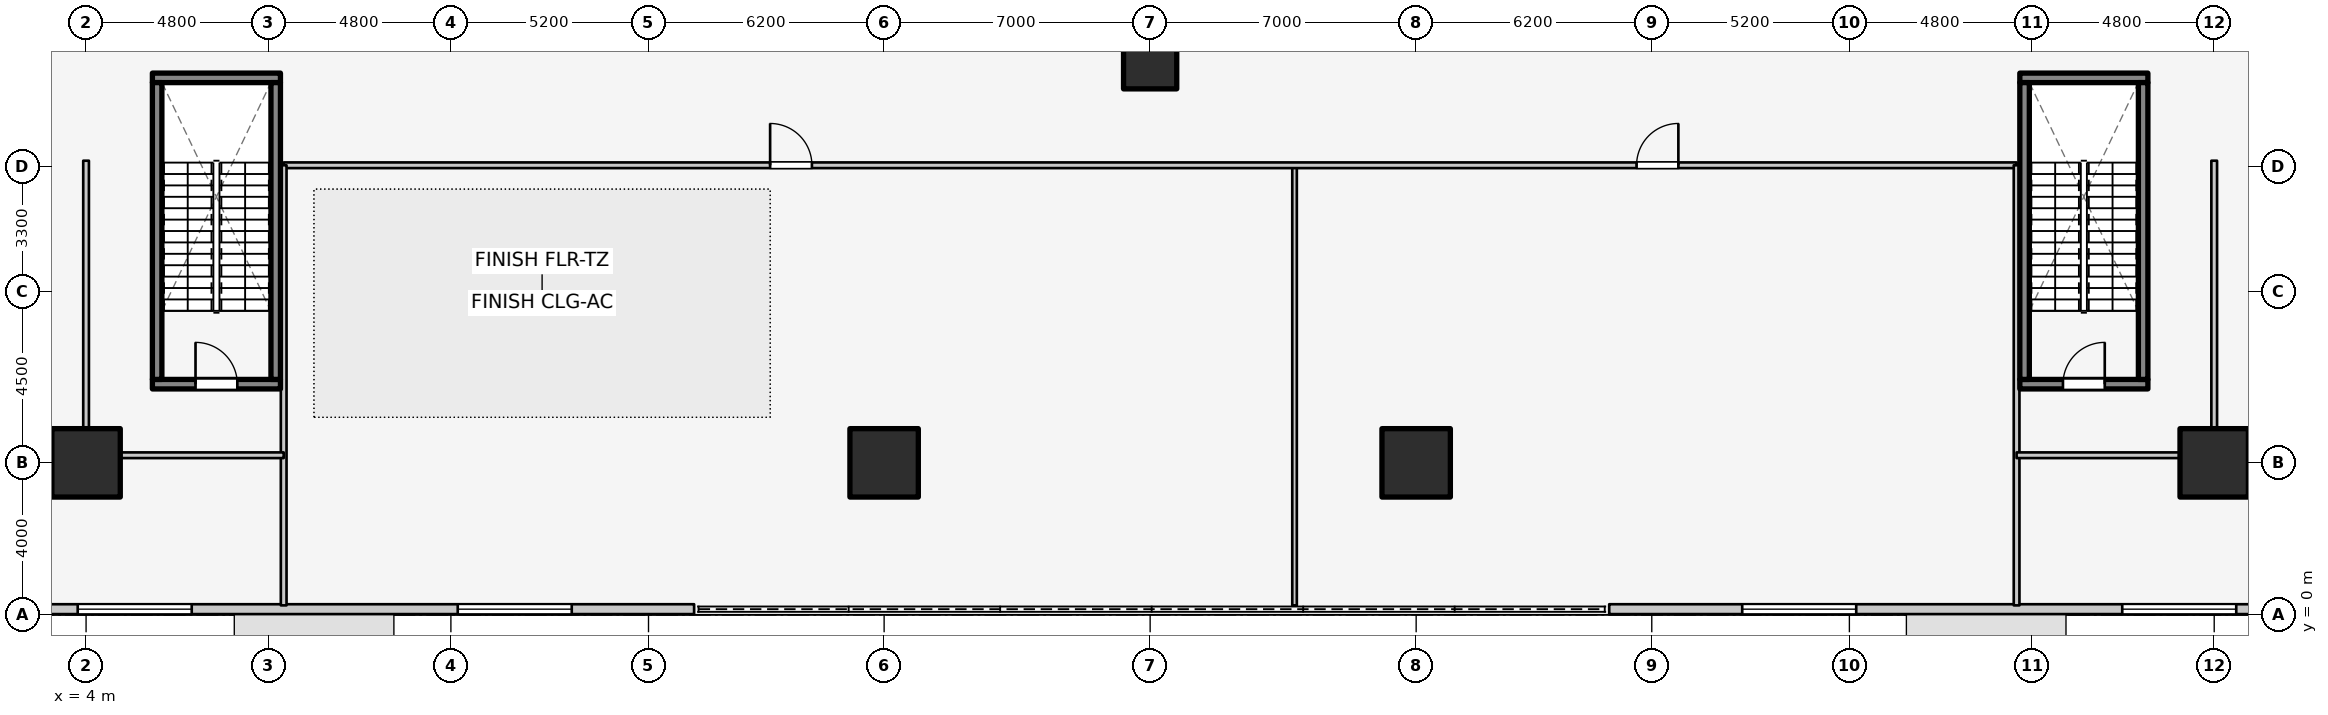
"""IFC4 building model, lengths in metres.
Left out: names, types, materials, properties, quantities, classifications, styles, units other than length and angle.
Written with IfcOpenShell. Run it as: python <this file> out.ifc"""

import sys

from ifc_helpers import new_model, si_unit, direction, frame, frame_2d, origin, origin_2d, place, context, subcontext, project, spatial, rectangle, extrude, element, fill, save


model = new_model("IFC4")
c1 = context("Model", 3, precision=1e-05, world=origin(), true_north=direction((0.0, 1.0)))
c2 = subcontext(c1, "Body", "Model", "MODEL_VIEW")
j1 = project(units=[si_unit("LENGTHUNIT", "METRE"), si_unit("PLANEANGLEUNIT", "RADIAN")], contexts=[c1])
p1 = place(None, origin())
s1 = spatial("IfcSite", under=j1, at=p1, CompositionType="ELEMENT")
p2 = place(p1, origin())
s2 = spatial("IfcBuilding", under=s1, at=p2, CompositionType="ELEMENT")
p3 = place(p2, frame((0.0, 0.0, 4.6)))
s3 = spatial("IfcBuildingStorey", under=s2, at=p3, CompositionType="ELEMENT", Elevation=4.6)
p4 = place(p3, frame((5.745, 6.07, 0.0), z_axis=(0.0, 0.0, 1.0), x_axis=(1.0, 0.0, 0.0)))
e1 = element("IfcWall", 1, at=p4, inside=s3, PredefinedType="SOLIDWALL", context=c2, shape_type="SweptSolid", body=[
    extrude(rectangle(XDim=3.37, YDim=0.25, at=frame_2d((1.685, 0.0))), origin(), (0.0, 0.0, 1.0), 4.6),
])
p5 = place(p4, frame((1.135, 0.0, 0.0)))
e2 = element("IfcOpeningElement", 2, at=p5, cuts=e1, PredefinedType="OPENING", context=c2, shape_type="SweptSolid", body=[
    extrude(rectangle(XDim=1.1, YDim=2.1, at=frame_2d((0.55, 1.05))), frame((0.0, 0.135, 0.0), z_axis=(0.0, -1.0, 0.0), x_axis=(1.0, 0.0, 0.0)), (0.0, 0.0, 1.0), 0.27),
])
p6 = place(p3, frame((5.745, 14.13, 0.0), z_axis=(0.0, 0.0, 1.0), x_axis=(1.0, 0.0, 0.0)))
e3 = element("IfcWall", 3, at=p6, inside=s3, PredefinedType="SOLIDWALL", context=c2, shape_type="SweptSolid", body=[
    extrude(rectangle(XDim=3.37, YDim=0.25, at=frame_2d((1.685, 0.0))), origin(), (0.0, 0.0, 1.0), 4.6),
])
for number, where, z_axis, x_axis in (
    (4, (5.87, 6.195, 0.0), (0.0, 0.0, 1.0), (0.0, 1.0, 0.0)),
    (5, (8.99, 6.195, 0.0), (0.0, 0.0, 1.0), (0.0, 1.0, 0.0)),
):
    element("IfcWall", number, at=place(p3, frame(where, z_axis=z_axis, x_axis=x_axis)), inside=s3, PredefinedType="SOLIDWALL", context=c2, shape_type="SweptSolid", body=[
        extrude(rectangle(XDim=7.81, YDim=0.25, at=frame_2d((3.905, 0.0))), origin(), (0.0, 0.0, 1.0), 4.6),
    ])
p7 = place(p3, frame((54.885, 6.07, 0.0), z_axis=(0.0, 0.0, 1.0), x_axis=(1.0, 0.0, 0.0)))
e6 = element("IfcWall", 6, at=p7, inside=s3, PredefinedType="SOLIDWALL", context=c2, shape_type="SweptSolid", body=[
    extrude(rectangle(XDim=3.37, YDim=0.25, at=frame_2d((1.685, 0.0))), origin(), (0.0, 0.0, 1.0), 4.6),
])
p8 = place(p7, frame((1.135, 0.0, 0.0)))
e7 = element("IfcOpeningElement", 7, at=p8, cuts=e6, PredefinedType="OPENING", context=c2, shape_type="SweptSolid", body=[
    extrude(rectangle(XDim=1.1, YDim=2.1, at=frame_2d((0.55, 1.05))), frame((0.0, 0.135, 0.0), z_axis=(0.0, -1.0, 0.0), x_axis=(1.0, 0.0, 0.0)), (0.0, 0.0, 1.0), 0.27),
])
p9 = place(p3, frame((54.885, 14.13, 0.0), z_axis=(0.0, 0.0, 1.0), x_axis=(1.0, 0.0, 0.0)))
e8 = element("IfcWall", 8, at=p9, inside=s3, PredefinedType="SOLIDWALL", context=c2, shape_type="SweptSolid", body=[
    extrude(rectangle(XDim=3.37, YDim=0.25, at=frame_2d((1.685, 0.0))), origin(), (0.0, 0.0, 1.0), 4.6),
])
for number, where, z_axis, x_axis in (
    (9, (55.01, 6.195, 0.0), (0.0, 0.0, 1.0), (0.0, 1.0, 0.0)),
    (10, (58.13, 6.195, 0.0), (0.0, 0.0, 1.0), (0.0, 1.0, 0.0)),
):
    element("IfcWall", number, at=place(p3, frame(where, z_axis=z_axis, x_axis=x_axis)), inside=s3, PredefinedType="SOLIDWALL", context=c2, shape_type="SweptSolid", body=[
        extrude(rectangle(XDim=7.81, YDim=0.25, at=frame_2d((3.905, 0.0))), origin(), (0.0, 0.0, 1.0), 4.6),
    ])
for number, where, z_axis, x_axis in (
    (11, (4.0, 4.0, 0.0), (0.0, 0.0, 1.0), (1.0, 0.0, 0.0)),
    (12, (25.0, 4.0, 0.0), (0.0, 0.0, 1.0), (1.0, 0.0, 0.0)),
    (13, (39.0, 4.0, 0.0), (0.0, 0.0, 1.0), (1.0, 0.0, 0.0)),
    (14, (60.0, 4.0, 0.0), (0.0, 0.0, 1.0), (1.0, 0.0, 0.0)),
):
    element("IfcColumn", number, at=place(p3, frame(where, z_axis=z_axis, x_axis=x_axis)), inside=s3, PredefinedType="COLUMN", context=c2, shape_type="SweptSolid", body=[
        extrude(rectangle(XDim=1.8, YDim=1.8, at=origin_2d()), origin(), (0.0, 0.0, 1.0), 4.6),
    ])
p10 = place(p3, frame((32.0, 14.54, 0.0), z_axis=(0.0, 0.0, 1.0), x_axis=(1.0, 0.0, 0.0)))
e15 = element("IfcColumn", 15, at=p10, inside=s3, PredefinedType="COLUMN", context=c2, shape_type="SweptSolid", body=[
    extrude(rectangle(XDim=1.4, YDim=1.4, at=origin_2d()), origin(), (0.0, 0.0, 1.0), 4.6),
])
p11 = place(p3, frame((0.28, 0.15, 0.0), z_axis=(0.0, 0.0, 1.0), x_axis=(1.0, 0.0, 0.0)))
e16 = element("IfcWall", 16, at=p11, inside=s3, PredefinedType="STANDARD", context=c2, shape_type="SweptSolid", body=[
    extrude(rectangle(XDim=19.72, YDim=0.26, at=frame_2d((9.86, 0.0))), origin(), (0.0, 0.0, 1.0), 4.28),
])
p12 = place(p11, frame((3.5, 0.0, 0.9)))
e17 = element("IfcOpeningElement", 17, at=p12, cuts=e16, PredefinedType="OPENING", context=c2, shape_type="SweptSolid", body=[
    extrude(rectangle(XDim=3.0, YDim=2.4, at=frame_2d((1.5, 1.2))), frame((0.0, 0.14, 0.0), z_axis=(0.0, -1.0, 0.0), x_axis=(1.0, 0.0, 0.0)), (0.0, 0.0, 1.0), 0.28),
])
p13 = place(p11, frame((13.5, 0.0, 0.9)))
e18 = element("IfcOpeningElement", 18, at=p13, cuts=e16, PredefinedType="OPENING", context=c2, shape_type="SweptSolid", body=[
    extrude(rectangle(XDim=3.0, YDim=2.4, at=frame_2d((1.5, 1.2))), frame((0.0, 0.14, 0.0), z_axis=(0.0, -1.0, 0.0), x_axis=(1.0, 0.0, 0.0)), (0.0, 0.0, 1.0), 0.28),
])
p14 = place(p3, frame((44.08, 0.15, 0.0), z_axis=(0.0, 0.0, 1.0), x_axis=(1.0, 0.0, 0.0)))
e19 = element("IfcWall", 19, at=p14, inside=s3, PredefinedType="STANDARD", context=c2, shape_type="SweptSolid", body=[
    extrude(rectangle(XDim=19.64, YDim=0.26, at=frame_2d((9.82, 0.0))), origin(), (0.0, 0.0, 1.0), 4.28),
])
p15 = place(p14, frame((3.5, 0.0, 0.9)))
e20 = element("IfcOpeningElement", 20, at=p15, cuts=e19, PredefinedType="OPENING", context=c2, shape_type="SweptSolid", body=[
    extrude(rectangle(XDim=3.0, YDim=2.4, at=frame_2d((1.5, 1.2))), frame((0.0, 0.14, 0.0), z_axis=(0.0, -1.0, 0.0), x_axis=(1.0, 0.0, 0.0)), (0.0, 0.0, 1.0), 0.28),
])
p16 = place(p14, frame((13.5, 0.0, 0.9)))
e21 = element("IfcOpeningElement", 21, at=p16, cuts=e19, PredefinedType="OPENING", context=c2, shape_type="SweptSolid", body=[
    extrude(rectangle(XDim=3.0, YDim=2.4, at=frame_2d((1.5, 1.2))), frame((0.0, 0.14, 0.0), z_axis=(0.0, -1.0, 0.0), x_axis=(1.0, 0.0, 0.0)), (0.0, 0.0, 1.0), 0.28),
])
for number, where, z_axis, x_axis in (
    (22, (30.157, 15.157, 0.0), (0.0, 0.0, 1.0), (0.989, -0.149, 0.0)),
    (23, (32.0, 14.88, 0.0), (0.0, 0.0, 1.0), (0.989, 0.149, 0.0)),
):
    element("IfcWall", number, at=place(p3, frame(where, z_axis=z_axis, x_axis=x_axis)), inside=s3, PredefinedType="STANDARD", context=c2, shape_type="SweptSolid", body=[
        extrude(rectangle(XDim=1.864, YDim=0.23, at=frame_2d((0.932, 0.0))), origin(), (0.0, 0.0, 1.0), 3.28),
    ])
p17 = place(p3, frame((35.8, 0.25, 0.0), z_axis=(0.0, 0.0, 1.0), x_axis=(0.0, 1.0, 0.0)))
e24 = element("IfcWall", 24, at=p17, inside=s3, PredefinedType="MOVABLE", context=c2, shape_type="SweptSolid", body=[
    extrude(rectangle(XDim=11.53, YDim=0.12, at=frame_2d((5.765, 0.0))), origin(), (0.0, 0.0, 1.0), 3.3),
])
p18 = place(p3, frame((9.2, 11.83, 0.0), z_axis=(0.0, 0.0, 1.0), x_axis=(1.0, 0.0, 0.0)))
e25 = element("IfcWall", 25, at=p18, inside=s3, PredefinedType="PARTITIONING", context=c2, shape_type="SweptSolid", body=[
    extrude(rectangle(XDim=45.6, YDim=0.15, at=frame_2d((22.8, 0.0))), origin(), (0.0, 0.0, 1.0), 3.3),
])
p19 = place(p18, frame((12.8, 0.0, 0.0)))
e26 = element("IfcOpeningElement", 26, at=p19, cuts=e25, PredefinedType="OPENING", context=c2, shape_type="SweptSolid", body=[
    extrude(rectangle(XDim=1.1, YDim=2.1, at=frame_2d((0.55, 1.05))), frame((0.0, 0.085, 0.0), z_axis=(0.0, -1.0, 0.0), x_axis=(1.0, 0.0, 0.0)), (0.0, 0.0, 1.0), 0.17),
])
p20 = place(p18, frame((35.6, 0.0, 0.0)))
e27 = element("IfcOpeningElement", 27, at=p20, cuts=e25, PredefinedType="OPENING", context=c2, shape_type="SweptSolid", body=[
    extrude(rectangle(XDim=1.1, YDim=2.1, at=frame_2d((0.55, 1.05))), frame((0.0, 0.085, 0.0), z_axis=(0.0, -1.0, 0.0), x_axis=(1.0, 0.0, 0.0)), (0.0, 0.0, 1.0), 0.17),
])
for number, where, z_axis, x_axis in (
    (28, (9.2, 0.25, 0.0), (0.0, 0.0, 1.0), (0.0, 1.0, 0.0)),
    (29, (54.8, 0.25, 0.0), (0.0, 0.0, 1.0), (0.0, 1.0, 0.0)),
):
    element("IfcWall", number, at=place(p3, frame(where, z_axis=z_axis, x_axis=x_axis)), inside=s3, PredefinedType="PARTITIONING", context=c2, shape_type="SweptSolid", body=[
        extrude(rectangle(XDim=11.58, YDim=0.15, at=frame_2d((5.79, 0.0))), origin(), (0.0, 0.0, 1.0), 3.3),
    ])
p21 = place(p3, frame((4.0, 4.2, 0.0), z_axis=(0.0, 0.0, 1.0), x_axis=(0.0, 1.0, 0.0)))
e30 = element("IfcWall", 30, at=p21, inside=s3, PredefinedType="PARTITIONING", context=c2, shape_type="SweptSolid", body=[
    extrude(rectangle(XDim=7.75, YDim=0.15, at=frame_2d((3.875, 0.0))), origin(), (0.0, 0.0, 1.0), 3.3),
])
p22 = place(p3, frame((4.0, 4.2, 0.0), z_axis=(0.0, 0.0, 1.0), x_axis=(1.0, 0.0, 0.0)))
e31 = element("IfcWall", 31, at=p22, inside=s3, PredefinedType="PARTITIONING", context=c2, shape_type="SweptSolid", body=[
    extrude(rectangle(XDim=5.2, YDim=0.15, at=frame_2d((2.6, 0.0))), origin(), (0.0, 0.0, 1.0), 3.3),
])
p23 = place(p3, frame((60.0, 4.2, 0.0), z_axis=(0.0, 0.0, 1.0), x_axis=(0.0, 1.0, 0.0)))
e32 = element("IfcWall", 32, at=p23, inside=s3, PredefinedType="PARTITIONING", context=c2, shape_type="SweptSolid", body=[
    extrude(rectangle(XDim=7.75, YDim=0.15, at=frame_2d((3.875, 0.0))), origin(), (0.0, 0.0, 1.0), 3.3),
])
p24 = place(p3, frame((54.8, 4.2, 0.0), z_axis=(0.0, 0.0, 1.0), x_axis=(1.0, 0.0, 0.0)))
e33 = element("IfcWall", 33, at=p24, inside=s3, PredefinedType="PARTITIONING", context=c2, shape_type="SweptSolid", body=[
    extrude(rectangle(XDim=5.2, YDim=0.15, at=frame_2d((2.6, 0.0))), origin(), (0.0, 0.0, 1.0), 3.3),
])
p25 = place(p12, origin())
e34 = element("IfcWindow", 34, at=p25, inside=s3, PartitioningType="SINGLE_PANEL", PredefinedType="WINDOW", context=c2, shape_type="SweptSolid", body=[
    extrude(rectangle(XDim=3.0, YDim=2.4, at=frame_2d((1.5, 1.2))), frame((0.0, 0.03, 0.0), z_axis=(0.0, -1.0, 0.0), x_axis=(1.0, 0.0, 0.0)), (0.0, 0.0, 1.0), 0.06),
])
fill(e17, e34)
p26 = place(p13, origin())
e35 = element("IfcWindow", 35, at=p26, inside=s3, PartitioningType="SINGLE_PANEL", PredefinedType="WINDOW", context=c2, shape_type="SweptSolid", body=[
    extrude(rectangle(XDim=3.0, YDim=2.4, at=frame_2d((1.5, 1.2))), frame((0.0, 0.03, 0.0), z_axis=(0.0, -1.0, 0.0), x_axis=(1.0, 0.0, 0.0)), (0.0, 0.0, 1.0), 0.06),
])
fill(e18, e35)
p27 = place(p15, origin())
e36 = element("IfcWindow", 36, at=p27, inside=s3, PartitioningType="SINGLE_PANEL", PredefinedType="WINDOW", context=c2, shape_type="SweptSolid", body=[
    extrude(rectangle(XDim=3.0, YDim=2.4, at=frame_2d((1.5, 1.2))), frame((0.0, 0.03, 0.0), z_axis=(0.0, -1.0, 0.0), x_axis=(1.0, 0.0, 0.0)), (0.0, 0.0, 1.0), 0.06),
])
fill(e20, e36)
p28 = place(p16, origin())
e37 = element("IfcWindow", 37, at=p28, inside=s3, PartitioningType="SINGLE_PANEL", PredefinedType="WINDOW", context=c2, shape_type="SweptSolid", body=[
    extrude(rectangle(XDim=3.0, YDim=2.4, at=frame_2d((1.5, 1.2))), frame((0.0, 0.03, 0.0), z_axis=(0.0, -1.0, 0.0), x_axis=(1.0, 0.0, 0.0)), (0.0, 0.0, 1.0), 0.06),
])
fill(e21, e37)
p29 = place(p5, origin())
e38 = element("IfcDoor", 38, at=p29, inside=s3, OperationType="SINGLE_SWING_LEFT", PredefinedType="DOOR", context=c2, shape_type="SweptSolid", body=[
    extrude(rectangle(XDim=1.1, YDim=2.1, at=frame_2d((0.55, 1.05))), frame((0.0, 0.025, 0.0), z_axis=(0.0, -1.0, 0.0), x_axis=(1.0, 0.0, 0.0)), (0.0, 0.0, 1.0), 0.05),
])
fill(e2, e38)
p30 = place(p8, origin())
e39 = element("IfcDoor", 39, at=p30, inside=s3, OperationType="SINGLE_SWING_RIGHT", PredefinedType="DOOR", context=c2, shape_type="SweptSolid", body=[
    extrude(rectangle(XDim=1.1, YDim=2.1, at=frame_2d((0.55, 1.05))), frame((0.0, 0.025, 0.0), z_axis=(0.0, -1.0, 0.0), x_axis=(1.0, 0.0, 0.0)), (0.0, 0.0, 1.0), 0.05),
])
fill(e7, e39)
p31 = place(p19, origin())
e40 = element("IfcDoor", 40, at=p31, inside=s3, OperationType="SINGLE_SWING_LEFT", PredefinedType="DOOR", context=c2, shape_type="SweptSolid", body=[
    extrude(rectangle(XDim=1.1, YDim=2.1, at=frame_2d((0.55, 1.05))), frame((0.0, 0.025, 0.0), z_axis=(0.0, -1.0, 0.0), x_axis=(1.0, 0.0, 0.0)), (0.0, 0.0, 1.0), 0.05),
])
fill(e26, e40)
p32 = place(p20, origin())
e41 = element("IfcDoor", 41, at=p32, inside=s3, OperationType="SINGLE_SWING_RIGHT", PredefinedType="DOOR", context=c2, shape_type="SweptSolid", body=[
    extrude(rectangle(XDim=1.1, YDim=2.1, at=frame_2d((0.55, 1.05))), frame((0.0, 0.025, 0.0), z_axis=(0.0, -1.0, 0.0), x_axis=(1.0, 0.0, 0.0)), (0.0, 0.0, 1.0), 0.05),
])
fill(e27, e41)
save(model, sys.argv[1])
